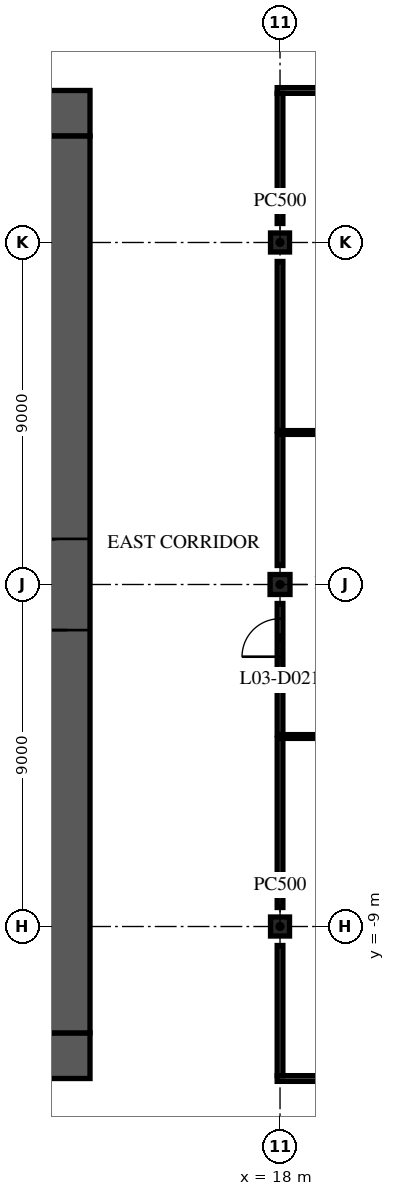
"""IFC4 building model, lengths in metres.
Left out: names, types, materials, properties, quantities, classifications, styles, units other than length and angle.
Written with IfcOpenShell. Run it as: python <this file> out.ifc"""

import sys

from ifc_helpers import new_model, si_unit, direction, frame, frame_2d, origin, origin_2d, place, context, subcontext, project, spatial, rectangle, extrude, element, fill, save


model = new_model("IFC4")
c1 = context("Model", 3, precision=1e-05, world=origin(), true_north=direction((0.0, 1.0)))
c2 = subcontext(c1, "Body", "Model", "MODEL_VIEW")
j1 = project(units=[si_unit("LENGTHUNIT", "METRE"), si_unit("PLANEANGLEUNIT", "RADIAN")], contexts=[c1])
p1 = place(None, origin())
s1 = spatial("IfcSite", under=j1, at=p1, CompositionType="ELEMENT")
p2 = place(p1, origin())
s2 = spatial("IfcBuilding", under=s1, at=p2, CompositionType="ELEMENT")
p3 = place(p2, frame((0.0, 0.0, 13.5)))
s3 = spatial("IfcBuildingStorey", under=s2, at=p3, CompositionType="ELEMENT", Elevation=13.5)
p4 = place(p3, frame((18.0, -9.0, 0.0), z_axis=(0.0, 0.0, 1.0), x_axis=(1.0, 0.0, 0.0)))
e1 = element("IfcColumn", 1, at=p4, inside=s3, PredefinedType="COLUMN", context=c2, shape_type="SweptSolid", body=[
    extrude(rectangle(XDim=0.5, YDim=0.5, at=origin_2d()), origin(), (0.0, 0.0, 1.0), 4.5),
])
p5 = place(p3, frame((18.0, 0.0, 0.0), z_axis=(0.0, 0.0, 1.0), x_axis=(1.0, 0.0, 0.0)))
e2 = element("IfcColumn", 2, at=p5, inside=s3, PredefinedType="COLUMN", context=c2, shape_type="SweptSolid", body=[
    extrude(rectangle(XDim=0.525, YDim=0.525, at=origin_2d()), origin(), (0.0, 0.0, 1.0), 4.5),
])
p6 = place(p3, frame((18.0, 9.0, 0.0), z_axis=(0.0, 0.0, 1.0), x_axis=(1.0, 0.0, 0.0)))
e3 = element("IfcColumn", 3, at=p6, inside=s3, PredefinedType="COLUMN", context=c2, shape_type="SweptSolid", body=[
    extrude(rectangle(XDim=0.5, YDim=0.5, at=origin_2d()), origin(), (0.0, 0.0, 1.0), 4.5),
])
p7 = place(p3, frame((-13.0, 12.4, 0.0), z_axis=(0.0, 0.0, 1.0), x_axis=(1.0, 0.0, 0.0)))
e4 = element("IfcWall", 4, at=p7, inside=s3, PredefinedType="SHEAR", context=c2, shape_type="SweptSolid", body=[
    extrude(rectangle(XDim=26.0, YDim=1.2, at=frame_2d((13.0, 0.0))), origin(), (0.0, 0.0, 1.0), 4.1),
])
p8 = place(p7, frame((11.8, 0.0, 0.0)))
e5 = element("IfcOpeningElement", 5, at=p8, cuts=e4, PredefinedType="OPENING", context=c2, shape_type="SweptSolid", body=[
    extrude(rectangle(XDim=2.4, YDim=2.4, at=frame_2d((1.2, 1.2))), frame((0.0, 0.61, 0.0), z_axis=(0.0, -1.0, 0.0), x_axis=(1.0, 0.0, 0.0)), (0.0, 0.0, 1.0), 1.22),
])
p9 = place(p7, frame((22.625, 0.0, 0.0)))
e6 = element("IfcOpeningElement", 6, at=p9, cuts=e4, PredefinedType="OPENING", context=c2, shape_type="SweptSolid", body=[
    extrude(rectangle(XDim=1.2, YDim=2.1, at=frame_2d((0.6, 1.05))), frame((0.0, 0.61, 0.0), z_axis=(0.0, -1.0, 0.0), x_axis=(1.0, 0.0, 0.0)), (0.0, 0.0, 1.0), 1.22),
])
p10 = place(p7, frame((1.6, 0.0, 0.0)))
e7 = element("IfcOpeningElement", 7, at=p10, cuts=e4, PredefinedType="OPENING", context=c2, shape_type="SweptSolid", body=[
    extrude(rectangle(XDim=1.0, YDim=2.1, at=frame_2d((0.5, 1.05))), frame((0.0, 0.61, 0.0), z_axis=(0.0, -1.0, 0.0), x_axis=(1.0, 0.0, 0.0)), (0.0, 0.0, 1.0), 1.22),
])
p11 = place(p3, frame((-13.0, -12.4, 0.0), z_axis=(0.0, 0.0, 1.0), x_axis=(1.0, 0.0, 0.0)))
e8 = element("IfcWall", 8, at=p11, inside=s3, PredefinedType="SHEAR", context=c2, shape_type="SweptSolid", body=[
    extrude(rectangle(XDim=26.0, YDim=1.2, at=frame_2d((13.0, 0.0))), origin(), (0.0, 0.0, 1.0), 4.1),
])
p12 = place(p11, frame((7.9, 0.0, 0.0)))
e9 = element("IfcOpeningElement", 9, at=p12, cuts=e8, PredefinedType="OPENING", context=c2, shape_type="SweptSolid", body=[
    extrude(rectangle(XDim=2.0, YDim=2.1, at=frame_2d((1.0, 1.05))), frame((0.0, 0.61, 0.0), z_axis=(0.0, -1.0, 0.0), x_axis=(1.0, 0.0, 0.0)), (0.0, 0.0, 1.0), 1.22),
])
p13 = place(p11, frame((18.025, 0.0, 0.0)))
e10 = element("IfcOpeningElement", 10, at=p13, cuts=e8, PredefinedType="OPENING", context=c2, shape_type="SweptSolid", body=[
    extrude(rectangle(XDim=1.2, YDim=2.1, at=frame_2d((0.6, 1.05))), frame((0.0, 0.61, 0.0), z_axis=(0.0, -1.0, 0.0), x_axis=(1.0, 0.0, 0.0)), (0.0, 0.0, 1.0), 1.22),
])
p14 = place(p11, frame((2.175, 0.0, 0.0)))
e11 = element("IfcOpeningElement", 11, at=p14, cuts=e8, PredefinedType="OPENING", context=c2, shape_type="SweptSolid", body=[
    extrude(rectangle(XDim=1.2, YDim=2.1, at=frame_2d((0.6, 1.05))), frame((0.0, 0.61, 0.0), z_axis=(0.0, -1.0, 0.0), x_axis=(1.0, 0.0, 0.0)), (0.0, 0.0, 1.0), 1.22),
])
p15 = place(p11, frame((22.625, 0.0, 0.0)))
e12 = element("IfcOpeningElement", 12, at=p15, cuts=e8, PredefinedType="OPENING", context=c2, shape_type="SweptSolid", body=[
    extrude(rectangle(XDim=1.2, YDim=2.1, at=frame_2d((0.6, 1.05))), frame((0.0, 0.61, 0.0), z_axis=(0.0, -1.0, 0.0), x_axis=(1.0, 0.0, 0.0)), (0.0, 0.0, 1.0), 1.22),
])
p16 = place(p3, frame((12.4, -11.8, 0.0), z_axis=(0.0, 0.0, 1.0), x_axis=(0.0, 1.0, 0.0)))
e13 = element("IfcWall", 13, at=p16, inside=s3, PredefinedType="SHEAR", context=c2, shape_type="SweptSolid", body=[
    extrude(rectangle(XDim=23.6, YDim=1.2, at=frame_2d((11.8, 0.0))), origin(), (0.0, 0.0, 1.0), 4.1),
])
p17 = place(p16, frame((10.6, 0.0, 0.0)))
e14 = element("IfcOpeningElement", 14, at=p17, cuts=e13, PredefinedType="OPENING", context=c2, shape_type="SweptSolid", body=[
    extrude(rectangle(XDim=2.4, YDim=2.4, at=frame_2d((1.2, 1.2))), frame((0.0, 0.61, 0.0), z_axis=(0.0, -1.0, 0.0), x_axis=(1.0, 0.0, 0.0)), (0.0, 0.0, 1.0), 1.22),
])
p18 = place(p3, frame((17.925, -13.0, 0.0), z_axis=(0.0, 0.0, 1.0), x_axis=(1.0, 0.0, 0.0)))
e15 = element("IfcWall", 15, at=p18, inside=s3, PredefinedType="PARTITIONING", context=c2, shape_type="SweptSolid", body=[
    extrude(rectangle(XDim=18.075, YDim=0.15, at=frame_2d((9.038, 0.0))), origin(), (0.0, 0.0, 1.0), 4.1),
])
p19 = place(p18, frame((13.075, 0.0, 0.0)))
e16 = element("IfcOpeningElement", 16, at=p19, cuts=e15, PredefinedType="OPENING", context=c2, shape_type="SweptSolid", body=[
    extrude(rectangle(XDim=1.0, YDim=2.1, at=frame_2d((0.5, 1.05))), frame((0.0, 0.085, 0.0), z_axis=(0.0, -1.0, 0.0), x_axis=(1.0, 0.0, 0.0)), (0.0, 0.0, 1.0), 0.17),
])
p20 = place(p3, frame((18.075, -4.0, 0.0), z_axis=(0.0, 0.0, 1.0), x_axis=(1.0, 0.0, 0.0)))
e17 = element("IfcWall", 17, at=p20, inside=s3, PredefinedType="PARTITIONING", context=c2, shape_type="SweptSolid", body=[
    extrude(rectangle(XDim=8.85, YDim=0.1, at=frame_2d((4.425, 0.0))), origin(), (0.0, 0.0, 1.0), 4.1),
])
p21 = place(p3, frame((18.075, 4.0, 0.0), z_axis=(0.0, 0.0, 1.0), x_axis=(1.0, 0.0, 0.0)))
e18 = element("IfcWall", 18, at=p21, inside=s3, PredefinedType="PARTITIONING", context=c2, shape_type="SweptSolid", body=[
    extrude(rectangle(XDim=8.447, YDim=0.1, at=frame_2d((4.223, 0.0))), origin(), (0.0, 0.0, 1.0), 4.1),
])
p22 = place(p3, frame((17.925, 13.0, 0.0), z_axis=(0.0, 0.0, 1.0), x_axis=(1.0, 0.0, 0.0)))
e19 = element("IfcWall", 19, at=p22, inside=s3, PredefinedType="PARTITIONING", context=c2, shape_type="SweptSolid", body=[
    extrude(rectangle(XDim=10.15, YDim=0.15, at=frame_2d((5.075, 0.0))), origin(), (0.0, 0.0, 1.0), 4.1),
])
p23 = place(p22, frame((4.575, 0.0, 0.0)))
e20 = element("IfcOpeningElement", 20, at=p23, cuts=e19, PredefinedType="OPENING", context=c2, shape_type="SweptSolid", body=[
    extrude(rectangle(XDim=1.0, YDim=2.1, at=frame_2d((0.5, 1.05))), frame((0.0, 0.085, 0.0), z_axis=(0.0, -1.0, 0.0), x_axis=(1.0, 0.0, 0.0)), (0.0, 0.0, 1.0), 0.17),
])
p24 = place(p3, frame((18.0, -12.925, 0.0), z_axis=(0.0, 0.0, 1.0), x_axis=(0.0, 1.0, 0.0)))
e21 = element("IfcWall", 21, at=p24, inside=s3, PredefinedType="PARTITIONING", context=c2, shape_type="SweptSolid", body=[
    extrude(rectangle(XDim=3.425, YDim=0.15, at=frame_2d((1.712, 0.0))), origin(), (0.0, 0.0, 1.0), 4.1),
])
p25 = place(p3, frame((18.0, -8.5, 0.0), z_axis=(0.0, 0.0, 1.0), x_axis=(0.0, 1.0, 0.0)))
e22 = element("IfcWall", 22, at=p25, inside=s3, PredefinedType="PARTITIONING", context=c2, shape_type="SweptSolid", body=[
    extrude(rectangle(XDim=4.45, YDim=0.15, at=frame_2d((2.225, 0.0))), origin(), (0.0, 0.0, 1.0), 4.1),
])
p26 = place(p3, frame((18.0, -3.95, 0.0), z_axis=(0.0, 0.0, 1.0), x_axis=(0.0, 1.0, 0.0)))
e23 = element("IfcWall", 23, at=p26, inside=s3, PredefinedType="PARTITIONING", context=c2, shape_type="SweptSolid", body=[
    extrude(rectangle(XDim=3.45, YDim=0.15, at=frame_2d((1.725, 0.0))), origin(), (0.0, 0.0, 1.0), 4.1),
])
p27 = place(p26, frame((2.05, 0.0, 0.0)))
e24 = element("IfcOpeningElement", 24, at=p27, cuts=e23, PredefinedType="OPENING", context=c2, shape_type="SweptSolid", body=[
    extrude(rectangle(XDim=1.0, YDim=2.1, at=frame_2d((0.5, 1.05))), frame((0.0, 0.085, 0.0), z_axis=(0.0, -1.0, 0.0), x_axis=(1.0, 0.0, 0.0)), (0.0, 0.0, 1.0), 0.17),
])
p28 = place(p3, frame((18.0, 0.5, 0.0), z_axis=(0.0, 0.0, 1.0), x_axis=(0.0, 1.0, 0.0)))
e25 = element("IfcWall", 25, at=p28, inside=s3, PredefinedType="PARTITIONING", context=c2, shape_type="SweptSolid", body=[
    extrude(rectangle(XDim=3.45, YDim=0.15, at=frame_2d((1.725, 0.0))), origin(), (0.0, 0.0, 1.0), 4.1),
])
p29 = place(p3, frame((18.0, 4.05, 0.0), z_axis=(0.0, 0.0, 1.0), x_axis=(0.0, 1.0, 0.0)))
e26 = element("IfcWall", 26, at=p29, inside=s3, PredefinedType="PARTITIONING", context=c2, shape_type="SweptSolid", body=[
    extrude(rectangle(XDim=4.45, YDim=0.15, at=frame_2d((2.225, 0.0))), origin(), (0.0, 0.0, 1.0), 4.1),
])
p30 = place(p3, frame((18.0, 9.5, 0.0), z_axis=(0.0, 0.0, 1.0), x_axis=(0.0, 1.0, 0.0)))
e27 = element("IfcWall", 27, at=p30, inside=s3, PredefinedType="PARTITIONING", context=c2, shape_type="SweptSolid", body=[
    extrude(rectangle(XDim=3.425, YDim=0.15, at=frame_2d((1.712, 0.0))), origin(), (0.0, 0.0, 1.0), 4.1),
])
p31 = place(p17, origin())
e28 = element("IfcDoor", 28, at=p31, inside=s3, OperationType="SINGLE_SWING_LEFT", PredefinedType="DOOR", context=c2, shape_type="SweptSolid", body=[
    extrude(rectangle(XDim=2.4, YDim=2.4, at=frame_2d((1.2, 1.2))), frame((0.0, 0.025, 0.0), z_axis=(0.0, -1.0, 0.0), x_axis=(1.0, 0.0, 0.0)), (0.0, 0.0, 1.0), 0.05),
])
fill(e14, e28)
p32 = place(p27, origin())
e29 = element("IfcDoor", 29, at=p32, inside=s3, OperationType="SINGLE_SWING_LEFT", PredefinedType="DOOR", context=c2, shape_type="SweptSolid", body=[
    extrude(rectangle(XDim=1.0, YDim=2.1, at=frame_2d((0.5, 1.05))), frame((0.0, 0.025, 0.0), z_axis=(0.0, -1.0, 0.0), x_axis=(1.0, 0.0, 0.0)), (0.0, 0.0, 1.0), 0.05),
])
fill(e24, e29)
save(model, sys.argv[1])
